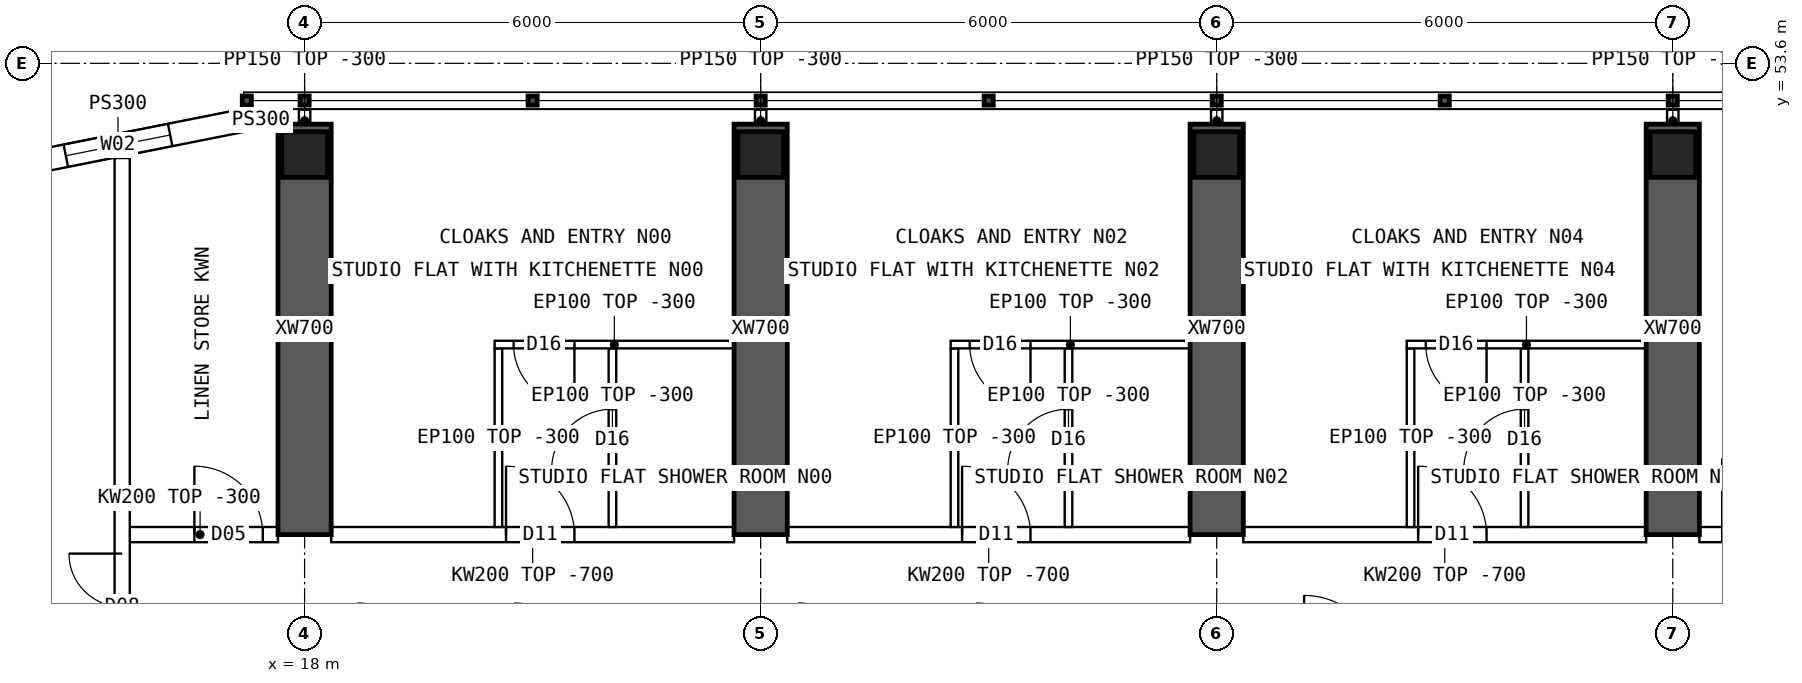
"""IFC4 building model, lengths in metres.
Left out: names, types, materials, properties, quantities, classifications, styles, units other than length and angle.
Written with IfcOpenShell. Run it as: python <this file> out.ifc"""

import sys

from ifc_helpers import new_model, si_unit, direction, frame, frame_2d, origin, origin_2d, place, context, subcontext, project, spatial, polyline, rectangle, hollow_rectangle, outline, extrude, element, fill, save


model = new_model("IFC4")
c1 = context("Model", 3, precision=1e-05, world=origin(), true_north=direction((0.0, 1.0)))
c2 = subcontext(c1, "Body", "Model", "MODEL_VIEW")
j1 = project(units=[si_unit("LENGTHUNIT", "METRE"), si_unit("PLANEANGLEUNIT", "RADIAN")], contexts=[c1])
p1 = place(None, origin())
s1 = spatial("IfcSite", under=j1, at=p1, CompositionType="ELEMENT")
p2 = place(p1, origin())
s2 = spatial("IfcBuilding", under=s1, at=p2, CompositionType="ELEMENT")
p3 = place(p2, frame((0.0, 0.0, 254.05)))
s3 = spatial("IfcBuildingStorey", under=s2, at=p3, CompositionType="ELEMENT", Elevation=254.05)
for number, where, z_axis, x_axis in (
    (1, (18.0, 52.4, 0.0), (0.0, 0.0, 1.0), (1.0, 0.0, 0.0)),
    (2, (24.0, 52.4, 0.0), (0.0, 0.0, 1.0), (1.0, 0.0, 0.0)),
    (3, (30.0, 52.4, 0.0), (0.0, 0.0, 1.0), (1.0, 0.0, 0.0)),
    (4, (36.0, 52.4, 0.0), (0.0, 0.0, 1.0), (1.0, 0.0, 0.0)),
):
    element("IfcColumn", number, at=place(p3, frame(where, z_axis=z_axis, x_axis=x_axis)), inside=s3, PredefinedType="COLUMN", context=c2, shape_type="SweptSolid", body=[
        extrude(hollow_rectangle(XDim=0.6, YDim=0.6, WallThickness=0.06, at=origin_2d()), origin(), (0.0, 0.0, 1.0), 3.75),
    ])
for number, where, z_axis, x_axis in (
    (5, (18.0, 47.4, 0.0), (0.0, 0.0, 1.0), (0.0, 1.0, 0.0)),
    (6, (24.0, 47.4, 0.0), (0.0, 0.0, 1.0), (0.0, 1.0, 0.0)),
    (7, (30.0, 47.4, 0.0), (0.0, 0.0, 1.0), (0.0, 1.0, 0.0)),
    (8, (36.0, 47.4, 0.0), (0.0, 0.0, 1.0), (0.0, 1.0, 0.0)),
):
    element("IfcWall", number, at=place(p3, frame(where, z_axis=z_axis, x_axis=x_axis)), inside=s3, PredefinedType="SHEAR", context=c2, shape_type="SweptSolid", body=[
        extrude(rectangle(XDim=5.4, YDim=0.7, at=frame_2d((2.7, 0.0))), origin(), (0.0, 0.0, 1.0), 3.75),
    ])
p4 = place(p3, frame((17.2, 52.85, 0.0), z_axis=(0.0, 0.0, 1.0), x_axis=(-0.98078325777, -0.195100490205, 0.0)))
e9 = element("IfcWall", 9, at=p4, inside=s3, PredefinedType="SOLIDWALL", context=c2, shape_type="SweptSolid", body=[
    extrude(outline(polyline([(-0.03, -0.15), (3.405, -0.15), (3.345, 0.15), (0.03, 0.15), (-0.03, -0.15)])), origin(), (0.0, 0.0, 1.0), 3.45),
])
p5 = place(p4, frame((0.988, 0.0, 0.9)))
e10 = element("IfcOpeningElement", 10, at=p5, cuts=e9, PredefinedType="OPENING", context=c2, shape_type="SweptSolid", body=[
    extrude(rectangle(XDim=1.4, YDim=1.8, at=frame_2d((0.7, 0.9))), frame((0.0, 0.16, 0.0), z_axis=(0.0, -1.0, 0.0), x_axis=(1.0, 0.0, 0.0)), (0.0, 0.0, 1.0), 0.32),
])
p6 = place(p3, frame((17.2, 52.85, 0.0), z_axis=(0.0, 0.0, 1.0), x_axis=(1.0, 0.0, 0.0)))
e11 = element("IfcWall", 11, at=p6, inside=s3, PredefinedType="SOLIDWALL", context=c2, shape_type="SweptSolid", body=[
    extrude(rectangle(XDim=0.45, YDim=0.3, at=frame_2d((0.225, 0.0))), origin(), (0.0, 0.0, 1.0), 3.45),
])
p7 = place(p3, frame((15.6, 47.4, 0.0), z_axis=(0.0, 0.0, 1.0), x_axis=(1.0, 0.0, 0.0)))
e12 = element("IfcWall", 12, at=p7, inside=s3, PredefinedType="SOLIDWALL", context=c2, shape_type="SweptSolid", body=[
    extrude(rectangle(XDim=2.05, YDim=0.2, at=frame_2d((1.025, 0.0))), origin(), (0.0, 0.0, 1.0), 3.45),
])
p8 = place(p7, frame((0.95, 0.0, 0.0)))
e13 = element("IfcOpeningElement", 13, at=p8, cuts=e12, PredefinedType="OPENING", context=c2, shape_type="SweptSolid", body=[
    extrude(rectangle(XDim=0.9, YDim=2.1, at=frame_2d((0.45, 1.05))), frame((0.0, 0.11, 0.0), z_axis=(0.0, -1.0, 0.0), x_axis=(1.0, 0.0, 0.0)), (0.0, 0.0, 1.0), 0.22),
])
p9 = place(p3, frame((18.35, 47.4, 0.0), z_axis=(0.0, 0.0, 1.0), x_axis=(1.0, 0.0, 0.0)))
e14 = element("IfcWall", 14, at=p9, inside=s3, PredefinedType="SOLIDWALL", context=c2, shape_type="SweptSolid", body=[
    extrude(outline(polyline([(0.0, 0.0), (5.3, 0.0), (5.3, 3.05), (0.0, 3.05), (0.0, 0.0)])), frame((0.0, 0.1, 0.0), z_axis=(0.0, -1.0, 0.0), x_axis=(1.0, 0.0, 0.0)), (0.0, 0.0, 1.0), 0.2),
])
p10 = place(p9, frame((2.3, 0.0, 0.0)))
e15 = element("IfcOpeningElement", 15, at=p10, cuts=e14, PredefinedType="OPENING", context=c2, shape_type="SweptSolid", body=[
    extrude(rectangle(XDim=0.9, YDim=2.1, at=frame_2d((0.45, 1.05))), frame((0.0, 0.11, 0.0), z_axis=(0.0, -1.0, 0.0), x_axis=(1.0, 0.0, 0.0)), (0.0, 0.0, 1.0), 0.22),
])
p11 = place(p3, frame((24.35, 47.4, 0.0), z_axis=(0.0, 0.0, 1.0), x_axis=(1.0, 0.0, 0.0)))
e16 = element("IfcWall", 16, at=p11, inside=s3, PredefinedType="SOLIDWALL", context=c2, shape_type="SweptSolid", body=[
    extrude(outline(polyline([(0.0, 0.0), (5.3, 0.0), (5.3, 3.05), (0.0, 3.05), (0.0, 0.0)])), frame((0.0, 0.1, 0.0), z_axis=(0.0, -1.0, 0.0), x_axis=(1.0, 0.0, 0.0)), (0.0, 0.0, 1.0), 0.2),
])
p12 = place(p11, frame((2.3, 0.0, 0.0)))
e17 = element("IfcOpeningElement", 17, at=p12, cuts=e16, PredefinedType="OPENING", context=c2, shape_type="SweptSolid", body=[
    extrude(rectangle(XDim=0.9, YDim=2.1, at=frame_2d((0.45, 1.05))), frame((0.0, 0.11, 0.0), z_axis=(0.0, -1.0, 0.0), x_axis=(1.0, 0.0, 0.0)), (0.0, 0.0, 1.0), 0.22),
])
p13 = place(p3, frame((30.35, 47.4, 0.0), z_axis=(0.0, 0.0, 1.0), x_axis=(1.0, 0.0, 0.0)))
e18 = element("IfcWall", 18, at=p13, inside=s3, PredefinedType="SOLIDWALL", context=c2, shape_type="SweptSolid", body=[
    extrude(outline(polyline([(0.0, 0.0), (5.3, 0.0), (5.3, 3.05), (0.0, 3.05), (0.0, 0.0)])), frame((0.0, 0.1, 0.0), z_axis=(0.0, -1.0, 0.0), x_axis=(1.0, 0.0, 0.0)), (0.0, 0.0, 1.0), 0.2),
])
p14 = place(p13, frame((2.3, 0.0, 0.0)))
e19 = element("IfcOpeningElement", 19, at=p14, cuts=e18, PredefinedType="OPENING", context=c2, shape_type="SweptSolid", body=[
    extrude(rectangle(XDim=0.9, YDim=2.1, at=frame_2d((0.45, 1.05))), frame((0.0, 0.11, 0.0), z_axis=(0.0, -1.0, 0.0), x_axis=(1.0, 0.0, 0.0)), (0.0, 0.0, 1.0), 0.22),
])
p15 = place(p3, frame((36.35, 47.4, 0.0), z_axis=(0.0, 0.0, 1.0), x_axis=(1.0, 0.0, 0.0)))
e20 = element("IfcWall", 20, at=p15, inside=s3, PredefinedType="SOLIDWALL", context=c2, shape_type="SweptSolid", body=[
    extrude(outline(polyline([(0.0, 0.0), (5.3, 0.0), (5.3, 3.05), (0.0, 3.05), (0.0, 0.0)])), frame((0.0, 0.1, 0.0), z_axis=(0.0, -1.0, 0.0), x_axis=(1.0, 0.0, 0.0)), (0.0, 0.0, 1.0), 0.2),
])
p16 = place(p15, frame((0.3, 0.0, 0.0)))
e21 = element("IfcOpeningElement", 21, at=p16, cuts=e20, PredefinedType="OPENING", context=c2, shape_type="SweptSolid", body=[
    extrude(rectangle(XDim=1.0, YDim=2.1, at=frame_2d((0.5, 1.05))), frame((0.0, 0.11, 0.0), z_axis=(0.0, -1.0, 0.0), x_axis=(1.0, 0.0, 0.0)), (0.0, 0.0, 1.0), 0.22),
])
p17 = place(p3, frame((20.5, 49.9, 0.0), z_axis=(0.0, 0.0, 1.0), x_axis=(1.0, 0.0, 0.0)))
e22 = element("IfcWall", 22, at=p17, inside=s3, PredefinedType="PARTITIONING", context=c2, shape_type="SweptSolid", body=[
    extrude(rectangle(XDim=3.15, YDim=0.1, at=frame_2d((1.575, 0.0))), origin(), (0.0, 0.0, 1.0), 3.45),
])
p18 = place(p17, frame((0.25, 0.0, 0.0)))
e23 = element("IfcOpeningElement", 23, at=p18, cuts=e22, PredefinedType="OPENING", context=c2, shape_type="SweptSolid", body=[
    extrude(rectangle(XDim=0.8, YDim=2.1, at=frame_2d((0.4, 1.05))), frame((0.0, 0.06, 0.0), z_axis=(0.0, -1.0, 0.0), x_axis=(1.0, 0.0, 0.0)), (0.0, 0.0, 1.0), 0.12),
])
p19 = place(p3, frame((20.55, 49.85, 0.0), z_axis=(0.0, 0.0, 1.0), x_axis=(0.0, -1.0, 0.0)))
e24 = element("IfcWall", 24, at=p19, inside=s3, PredefinedType="PARTITIONING", context=c2, shape_type="SweptSolid", body=[
    extrude(outline(polyline([(0.0, 0.0), (2.35, 0.0), (2.35, 3.05), (2.302, 3.05), (2.3, 3.45), (0.0, 3.45), (0.0, 0.0)])), frame((0.0, 0.05, 0.0), z_axis=(0.0, -1.0, 0.0), x_axis=(1.0, 0.0, 0.0)), (0.0, 0.0, 1.0), 0.1),
])
p20 = place(p3, frame((22.05, 49.85, 0.0), z_axis=(0.0, 0.0, 1.0), x_axis=(0.0, -1.0, 0.0)))
e25 = element("IfcWall", 25, at=p20, inside=s3, PredefinedType="PARTITIONING", context=c2, shape_type="SweptSolid", body=[
    extrude(outline(polyline([(0.0, 0.0), (2.35, 0.0), (2.35, 3.05), (2.302, 3.05), (2.3, 3.45), (0.0, 3.45), (0.0, 0.0)])), frame((0.0, 0.05, 0.0), z_axis=(0.0, -1.0, 0.0), x_axis=(1.0, 0.0, 0.0)), (0.0, 0.0, 1.0), 0.1),
])
p21 = place(p20, frame((0.8, 0.0, 0.0)))
e26 = element("IfcOpeningElement", 26, at=p21, cuts=e25, PredefinedType="OPENING", context=c2, shape_type="SweptSolid", body=[
    extrude(rectangle(XDim=0.8, YDim=2.1, at=frame_2d((0.4, 1.05))), frame((0.0, 0.06, 0.0), z_axis=(0.0, -1.0, 0.0), x_axis=(1.0, 0.0, 0.0)), (0.0, 0.0, 1.0), 0.12),
])
p22 = place(p3, frame((26.5, 49.9, 0.0), z_axis=(0.0, 0.0, 1.0), x_axis=(1.0, 0.0, 0.0)))
e27 = element("IfcWall", 27, at=p22, inside=s3, PredefinedType="PARTITIONING", context=c2, shape_type="SweptSolid", body=[
    extrude(rectangle(XDim=3.15, YDim=0.1, at=frame_2d((1.575, 0.0))), origin(), (0.0, 0.0, 1.0), 3.45),
])
p23 = place(p22, frame((0.25, 0.0, 0.0)))
e28 = element("IfcOpeningElement", 28, at=p23, cuts=e27, PredefinedType="OPENING", context=c2, shape_type="SweptSolid", body=[
    extrude(rectangle(XDim=0.8, YDim=2.1, at=frame_2d((0.4, 1.05))), frame((0.0, 0.06, 0.0), z_axis=(0.0, -1.0, 0.0), x_axis=(1.0, 0.0, 0.0)), (0.0, 0.0, 1.0), 0.12),
])
p24 = place(p3, frame((26.55, 49.85, 0.0), z_axis=(0.0, 0.0, 1.0), x_axis=(0.0, -1.0, 0.0)))
e29 = element("IfcWall", 29, at=p24, inside=s3, PredefinedType="PARTITIONING", context=c2, shape_type="SweptSolid", body=[
    extrude(outline(polyline([(0.0, 0.0), (2.35, 0.0), (2.35, 3.05), (2.302, 3.05), (2.3, 3.45), (0.0, 3.45), (0.0, 0.0)])), frame((0.0, 0.05, 0.0), z_axis=(0.0, -1.0, 0.0), x_axis=(1.0, 0.0, 0.0)), (0.0, 0.0, 1.0), 0.1),
])
p25 = place(p3, frame((28.05, 49.85, 0.0), z_axis=(0.0, 0.0, 1.0), x_axis=(0.0, -1.0, 0.0)))
e30 = element("IfcWall", 30, at=p25, inside=s3, PredefinedType="PARTITIONING", context=c2, shape_type="SweptSolid", body=[
    extrude(outline(polyline([(0.0, 0.0), (2.35, 0.0), (2.35, 3.05), (2.302, 3.05), (2.3, 3.45), (0.0, 3.45), (0.0, 0.0)])), frame((0.0, 0.05, 0.0), z_axis=(0.0, -1.0, 0.0), x_axis=(1.0, 0.0, 0.0)), (0.0, 0.0, 1.0), 0.1),
])
p26 = place(p25, frame((0.8, 0.0, 0.0)))
e31 = element("IfcOpeningElement", 31, at=p26, cuts=e30, PredefinedType="OPENING", context=c2, shape_type="SweptSolid", body=[
    extrude(rectangle(XDim=0.8, YDim=2.1, at=frame_2d((0.4, 1.05))), frame((0.0, 0.06, 0.0), z_axis=(0.0, -1.0, 0.0), x_axis=(1.0, 0.0, 0.0)), (0.0, 0.0, 1.0), 0.12),
])
p27 = place(p3, frame((32.5, 49.9, 0.0), z_axis=(0.0, 0.0, 1.0), x_axis=(1.0, 0.0, 0.0)))
e32 = element("IfcWall", 32, at=p27, inside=s3, PredefinedType="PARTITIONING", context=c2, shape_type="SweptSolid", body=[
    extrude(rectangle(XDim=3.15, YDim=0.1, at=frame_2d((1.575, 0.0))), origin(), (0.0, 0.0, 1.0), 3.45),
])
p28 = place(p27, frame((0.25, 0.0, 0.0)))
e33 = element("IfcOpeningElement", 33, at=p28, cuts=e32, PredefinedType="OPENING", context=c2, shape_type="SweptSolid", body=[
    extrude(rectangle(XDim=0.8, YDim=2.1, at=frame_2d((0.4, 1.05))), frame((0.0, 0.06, 0.0), z_axis=(0.0, -1.0, 0.0), x_axis=(1.0, 0.0, 0.0)), (0.0, 0.0, 1.0), 0.12),
])
p29 = place(p3, frame((32.55, 49.85, 0.0), z_axis=(0.0, 0.0, 1.0), x_axis=(0.0, -1.0, 0.0)))
e34 = element("IfcWall", 34, at=p29, inside=s3, PredefinedType="PARTITIONING", context=c2, shape_type="SweptSolid", body=[
    extrude(outline(polyline([(0.0, 0.0), (2.35, 0.0), (2.35, 3.05), (2.302, 3.05), (2.3, 3.45), (0.0, 3.45), (0.0, 0.0)])), frame((0.0, 0.05, 0.0), z_axis=(0.0, -1.0, 0.0), x_axis=(1.0, 0.0, 0.0)), (0.0, 0.0, 1.0), 0.1),
])
p30 = place(p3, frame((34.05, 49.85, 0.0), z_axis=(0.0, 0.0, 1.0), x_axis=(0.0, -1.0, 0.0)))
e35 = element("IfcWall", 35, at=p30, inside=s3, PredefinedType="PARTITIONING", context=c2, shape_type="SweptSolid", body=[
    extrude(outline(polyline([(0.0, 0.0), (2.35, 0.0), (2.35, 3.05), (2.302, 3.05), (2.3, 3.45), (0.0, 3.45), (0.0, 0.0)])), frame((0.0, 0.05, 0.0), z_axis=(0.0, -1.0, 0.0), x_axis=(1.0, 0.0, 0.0)), (0.0, 0.0, 1.0), 0.1),
])
p31 = place(p30, frame((0.8, 0.0, 0.0)))
e36 = element("IfcOpeningElement", 36, at=p31, cuts=e35, PredefinedType="OPENING", context=c2, shape_type="SweptSolid", body=[
    extrude(rectangle(XDim=0.8, YDim=2.1, at=frame_2d((0.4, 1.05))), frame((0.0, 0.06, 0.0), z_axis=(0.0, -1.0, 0.0), x_axis=(1.0, 0.0, 0.0)), (0.0, 0.0, 1.0), 0.12),
])
p32 = place(p3, frame((15.6, 11.646, 0.0), z_axis=(0.0, 0.0, 1.0), x_axis=(0.0, 1.0, 0.0)))
e37 = element("IfcWall", 37, at=p32, inside=s3, PredefinedType="SOLIDWALL", context=c2, shape_type="SweptSolid", body=[
    extrude(rectangle(XDim=40.708, YDim=0.2, at=frame_2d((20.354, 0.0))), origin(), (0.0, 0.0, 1.0), 3.45),
])
p33 = place(p32, frame((21.194, 0.0, 0.0)))
e38 = element("IfcOpeningElement", 38, at=p33, cuts=e37, PredefinedType="OPENING", context=c2, shape_type="SweptSolid", body=[
    extrude(rectangle(XDim=1.2, YDim=2.1, at=frame_2d((0.6, 1.05))), frame((0.0, 0.11, 0.0), z_axis=(0.0, -1.0, 0.0), x_axis=(1.0, 0.0, 0.0)), (0.0, 0.0, 1.0), 0.22),
])
p34 = place(p32, frame((5.104, 0.0, 0.0)))
e39 = element("IfcOpeningElement", 39, at=p34, cuts=e37, PredefinedType="OPENING", context=c2, shape_type="SweptSolid", body=[
    extrude(rectangle(XDim=1.4, YDim=2.1, at=frame_2d((0.7, 1.05))), frame((0.0, 0.11, 0.0), z_axis=(0.0, -1.0, 0.0), x_axis=(1.0, 0.0, 0.0)), (0.0, 0.0, 1.0), 0.22),
])
p35 = place(p32, frame((34.104, 0.0, 0.0)))
e40 = element("IfcOpeningElement", 40, at=p35, cuts=e37, PredefinedType="OPENING", context=c2, shape_type="SweptSolid", body=[
    extrude(rectangle(XDim=1.4, YDim=2.1, at=frame_2d((0.7, 1.05))), frame((0.0, 0.11, 0.0), z_axis=(0.0, -1.0, 0.0), x_axis=(1.0, 0.0, 0.0)), (0.0, 0.0, 1.0), 0.22),
])
for number, where, z_axis, x_axis in (
    (41, (18.0, 52.7, 0.0), (0.0, 0.0, 1.0), (0.0, 1.0, 0.0)),
    (42, (24.0, 52.7, 0.0), (0.0, 0.0, 1.0), (0.0, 1.0, 0.0)),
    (43, (30.0, 52.7, 0.0), (0.0, 0.0, 1.0), (0.0, 1.0, 0.0)),
    (44, (36.0, 52.7, 0.0), (0.0, 0.0, 1.0), (0.0, 1.0, 0.0)),
):
    element("IfcWall", number, at=place(p3, frame(where, z_axis=z_axis, x_axis=x_axis)), inside=s3, PredefinedType="PARTITIONING", context=c2, shape_type="SweptSolid", body=[
        extrude(rectangle(XDim=0.29, YDim=0.15, at=frame_2d((0.145, 0.0))), origin(), (0.0, 0.0, 1.0), 3.45),
    ])
p36 = place(p5, origin())
e45 = element("IfcWindow", 45, at=p36, inside=s3, PartitioningType="SINGLE_PANEL", PredefinedType="WINDOW", context=c2, shape_type="SweptSolid", body=[
    extrude(rectangle(XDim=1.4, YDim=1.8, at=frame_2d((0.7, 0.9))), frame((0.0, 0.03, 0.0), z_axis=(0.0, -1.0, 0.0), x_axis=(1.0, 0.0, 0.0)), (0.0, 0.0, 1.0), 0.06),
])
fill(e10, e45)
p37 = place(p18, origin())
e46 = element("IfcDoor", 46, at=p37, inside=s3, OperationType="SINGLE_SWING_RIGHT", PredefinedType="DOOR", context=c2, shape_type="SweptSolid", body=[
    extrude(rectangle(XDim=0.8, YDim=2.1, at=frame_2d((0.4, 1.05))), frame((0.0, 0.025, 0.0), z_axis=(0.0, -1.0, 0.0), x_axis=(1.0, 0.0, 0.0)), (0.0, 0.0, 1.0), 0.05),
])
fill(e23, e46)
p38 = place(p21, origin())
e47 = element("IfcDoor", 47, at=p38, inside=s3, OperationType="SINGLE_SWING_RIGHT", PredefinedType="DOOR", context=c2, shape_type="SweptSolid", body=[
    extrude(rectangle(XDim=0.8, YDim=2.1, at=frame_2d((0.4, 1.05))), frame((0.0, 0.025, 0.0), z_axis=(0.0, -1.0, 0.0), x_axis=(1.0, 0.0, 0.0)), (0.0, 0.0, 1.0), 0.05),
])
fill(e26, e47)
p39 = place(p10, origin())
e48 = element("IfcDoor", 48, at=p39, inside=s3, OperationType="SINGLE_SWING_LEFT", PredefinedType="DOOR", context=c2, shape_type="SweptSolid", body=[
    extrude(rectangle(XDim=0.9, YDim=2.1, at=frame_2d((0.45, 1.05))), frame((0.0, 0.025, 0.0), z_axis=(0.0, -1.0, 0.0), x_axis=(1.0, 0.0, 0.0)), (0.0, 0.0, 1.0), 0.05),
])
fill(e15, e48)
p40 = place(p23, origin())
e49 = element("IfcDoor", 49, at=p40, inside=s3, OperationType="SINGLE_SWING_RIGHT", PredefinedType="DOOR", context=c2, shape_type="SweptSolid", body=[
    extrude(rectangle(XDim=0.8, YDim=2.1, at=frame_2d((0.4, 1.05))), frame((0.0, 0.025, 0.0), z_axis=(0.0, -1.0, 0.0), x_axis=(1.0, 0.0, 0.0)), (0.0, 0.0, 1.0), 0.05),
])
fill(e28, e49)
p41 = place(p26, origin())
e50 = element("IfcDoor", 50, at=p41, inside=s3, OperationType="SINGLE_SWING_RIGHT", PredefinedType="DOOR", context=c2, shape_type="SweptSolid", body=[
    extrude(rectangle(XDim=0.8, YDim=2.1, at=frame_2d((0.4, 1.05))), frame((0.0, 0.025, 0.0), z_axis=(0.0, -1.0, 0.0), x_axis=(1.0, 0.0, 0.0)), (0.0, 0.0, 1.0), 0.05),
])
fill(e31, e50)
p42 = place(p12, origin())
e51 = element("IfcDoor", 51, at=p42, inside=s3, OperationType="SINGLE_SWING_LEFT", PredefinedType="DOOR", context=c2, shape_type="SweptSolid", body=[
    extrude(rectangle(XDim=0.9, YDim=2.1, at=frame_2d((0.45, 1.05))), frame((0.0, 0.025, 0.0), z_axis=(0.0, -1.0, 0.0), x_axis=(1.0, 0.0, 0.0)), (0.0, 0.0, 1.0), 0.05),
])
fill(e17, e51)
p43 = place(p28, origin())
e52 = element("IfcDoor", 52, at=p43, inside=s3, OperationType="SINGLE_SWING_RIGHT", PredefinedType="DOOR", context=c2, shape_type="SweptSolid", body=[
    extrude(rectangle(XDim=0.8, YDim=2.1, at=frame_2d((0.4, 1.05))), frame((0.0, 0.025, 0.0), z_axis=(0.0, -1.0, 0.0), x_axis=(1.0, 0.0, 0.0)), (0.0, 0.0, 1.0), 0.05),
])
fill(e33, e52)
p44 = place(p31, origin())
e53 = element("IfcDoor", 53, at=p44, inside=s3, OperationType="SINGLE_SWING_RIGHT", PredefinedType="DOOR", context=c2, shape_type="SweptSolid", body=[
    extrude(rectangle(XDim=0.8, YDim=2.1, at=frame_2d((0.4, 1.05))), frame((0.0, 0.025, 0.0), z_axis=(0.0, -1.0, 0.0), x_axis=(1.0, 0.0, 0.0)), (0.0, 0.0, 1.0), 0.05),
])
fill(e36, e53)
p45 = place(p14, origin())
e54 = element("IfcDoor", 54, at=p45, inside=s3, OperationType="SINGLE_SWING_LEFT", PredefinedType="DOOR", context=c2, shape_type="SweptSolid", body=[
    extrude(rectangle(XDim=0.9, YDim=2.1, at=frame_2d((0.45, 1.05))), frame((0.0, 0.025, 0.0), z_axis=(0.0, -1.0, 0.0), x_axis=(1.0, 0.0, 0.0)), (0.0, 0.0, 1.0), 0.05),
])
fill(e19, e54)
p46 = place(p35, origin())
e55 = element("IfcDoor", 55, at=p46, inside=s3, OperationType="DOUBLE_DOOR_SINGLE_SWING", PredefinedType="DOOR", context=c2, shape_type="SweptSolid", body=[
    extrude(rectangle(XDim=1.4, YDim=2.1, at=frame_2d((0.7, 1.05))), frame((0.0, 0.025, 0.0), z_axis=(0.0, -1.0, 0.0), x_axis=(1.0, 0.0, 0.0)), (0.0, 0.0, 1.0), 0.05),
])
fill(e40, e55)
p47 = place(p8, origin())
e56 = element("IfcDoor", 56, at=p47, inside=s3, OperationType="SINGLE_SWING_LEFT", PredefinedType="DOOR", context=c2, shape_type="SweptSolid", body=[
    extrude(rectangle(XDim=0.9, YDim=2.1, at=frame_2d((0.45, 1.05))), frame((0.0, 0.025, 0.0), z_axis=(0.0, -1.0, 0.0), x_axis=(1.0, 0.0, 0.0)), (0.0, 0.0, 1.0), 0.05),
])
fill(e13, e56)
save(model, sys.argv[1])
